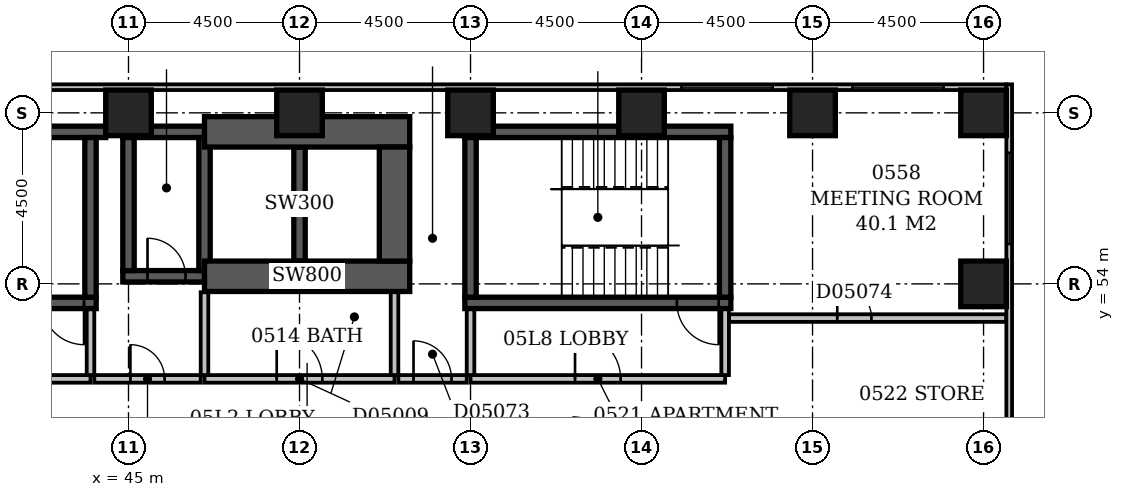
"""IFC4 building model, lengths in metres.
Left out: names, types, materials, properties, quantities, classifications, styles, units other than length and angle.
Written with IfcOpenShell. Run it as: python <this file> out.ifc"""

import sys

from ifc_helpers import new_model, si_unit, direction, frame, frame_2d, origin, origin_2d, place, context, subcontext, project, spatial, rectangle, extrude, element, fill, save


model = new_model("IFC4")
c1 = context("Model", 3, precision=1e-05, world=origin(), true_north=direction((0.0, 1.0)))
c2 = subcontext(c1, "Body", "Model", "MODEL_VIEW")
j1 = project(units=[si_unit("LENGTHUNIT", "METRE"), si_unit("PLANEANGLEUNIT", "RADIAN")], contexts=[c1])
p1 = place(None, origin())
s1 = spatial("IfcSite", under=j1, at=p1, CompositionType="ELEMENT")
p2 = place(p1, origin())
s2 = spatial("IfcBuilding", under=s1, at=p2, CompositionType="ELEMENT")
p3 = place(p2, frame((0.0, 0.0, 29.0)))
s3 = spatial("IfcBuildingStorey", under=s2, at=p3, CompositionType="ELEMENT", Elevation=29.0)
p4 = place(p3, frame((36.6, 58.0, -0.3), z_axis=(0.0, 0.0, 1.0), x_axis=(1.0, 0.0, 0.0)))
e1 = element("IfcWall", 1, at=p4, inside=s3, PredefinedType="SHEAR", context=c2, shape_type="SweptSolid", body=[
    extrude(rectangle(XDim=7.8, YDim=0.3, at=frame_2d((3.9, 0.0))), origin(), (0.0, 0.0, 1.0), 3.6),
])
p5 = place(p3, frame((37.15, 53.5, -0.3), z_axis=(0.0, 0.0, 1.0), x_axis=(1.0, 0.0, 0.0)))
e2 = element("IfcWall", 2, at=p5, inside=s3, PredefinedType="SHEAR", context=c2, shape_type="SweptSolid", body=[
    extrude(rectangle(XDim=7.0, YDim=0.3, at=frame_2d((3.5, 0.0))), origin(), (0.0, 0.0, 1.0), 3.6),
])
p6 = place(p5, frame((5.58, 0.0, 0.3)))
e3 = element("IfcOpeningElement", 3, at=p6, cuts=e2, PredefinedType="OPENING", context=c2, shape_type="SweptSolid", body=[
    extrude(rectangle(XDim=1.1, YDim=2.1, at=frame_2d((0.55, 1.05))), frame((0.0, 0.162, 0.0), z_axis=(0.0, -1.0, 0.0), x_axis=(1.0, 0.0, 0.0)), (0.0, 0.0, 1.0), 0.324),
])
p7 = place(p3, frame((44.0, 53.65, -0.3), z_axis=(0.0, 0.0, 1.0), x_axis=(0.0, 1.0, 0.0)))
e4 = element("IfcWall", 4, at=p7, inside=s3, PredefinedType="SHEAR", context=c2, shape_type="SweptSolid", body=[
    extrude(rectangle(XDim=4.2, YDim=0.3, at=frame_2d((2.1, 0.0))), origin(), (0.0, 0.0, 1.0), 3.6),
])
p8 = place(p3, frame((44.85, 54.2, -0.3), z_axis=(0.0, 0.0, 1.0), x_axis=(1.0, 0.0, 0.0)))
e5 = element("IfcWall", 5, at=p8, inside=s3, PredefinedType="SHEAR", context=c2, shape_type="SweptSolid", body=[
    extrude(rectangle(XDim=2.15, YDim=0.3, at=frame_2d((1.075, 0.0))), origin(), (0.0, 0.0, 1.0), 3.6),
])
p9 = place(p8, frame((0.65, 0.0, 0.3)))
e6 = element("IfcOpeningElement", 6, at=p9, cuts=e5, PredefinedType="OPENING", context=c2, shape_type="SweptSolid", body=[
    extrude(rectangle(XDim=1.0, YDim=2.1, at=frame_2d((0.5, 1.05))), frame((0.0, 0.162, 0.0), z_axis=(0.0, -1.0, 0.0), x_axis=(1.0, 0.0, 0.0)), (0.0, 0.0, 1.0), 0.324),
])
p10 = place(p3, frame((44.85, 58.0, -0.3), z_axis=(0.0, 0.0, 1.0), x_axis=(1.0, 0.0, 0.0)))
e7 = element("IfcWall", 7, at=p10, inside=s3, PredefinedType="SHEAR", context=c2, shape_type="SweptSolid", body=[
    extrude(rectangle(XDim=2.15, YDim=0.3, at=frame_2d((1.075, 0.0))), origin(), (0.0, 0.0, 1.0), 3.6),
])
p11 = place(p3, frame((45.0, 54.35, -0.3), z_axis=(0.0, 0.0, 1.0), x_axis=(0.0, 1.0, 0.0)))
e8 = element("IfcWall", 8, at=p11, inside=s3, PredefinedType="SHEAR", context=c2, shape_type="SweptSolid", body=[
    extrude(rectangle(XDim=3.5, YDim=0.3, at=frame_2d((1.75, 0.0))), origin(), (0.0, 0.0, 1.0), 3.6),
])
p12 = place(p3, frame((47.0, 54.2, -0.3), z_axis=(0.0, 0.0, 1.0), x_axis=(1.0, 0.0, 0.0)))
e9 = element("IfcWall", 9, at=p12, inside=s3, PredefinedType="SHEAR", context=c2, shape_type="SweptSolid", body=[
    extrude(rectangle(XDim=5.4, YDim=0.8, at=frame_2d((2.7, 0.0))), origin(), (0.0, 0.0, 1.0), 3.6),
])
p13 = place(p3, frame((47.0, 54.35, -0.3), z_axis=(0.0, 0.0, 1.0), x_axis=(0.0, 1.0, 0.0)))
e10 = element("IfcWall", 10, at=p13, inside=s3, PredefinedType="SHEAR", context=c2, shape_type="SweptSolid", body=[
    extrude(rectangle(XDim=3.5, YDim=0.3, at=frame_2d((1.75, 0.0))), origin(), (0.0, 0.0, 1.0), 3.6),
])
p14 = place(p3, frame((47.0, 58.0, -0.3), z_axis=(0.0, 0.0, 1.0), x_axis=(1.0, 0.0, 0.0)))
e11 = element("IfcWall", 11, at=p14, inside=s3, PredefinedType="SHEAR", context=c2, shape_type="SweptSolid", body=[
    extrude(rectangle(XDim=5.4, YDim=0.8, at=frame_2d((2.7, 0.0))), origin(), (0.0, 0.0, 1.0), 3.6),
])
p15 = place(p3, frame((49.5, 54.6, -0.3), z_axis=(0.0, 0.0, 1.0), x_axis=(0.0, 1.0, 0.0)))
e12 = element("IfcWall", 12, at=p15, inside=s3, PredefinedType="SHEAR", context=c2, shape_type="SweptSolid", body=[
    extrude(rectangle(XDim=3.0, YDim=0.3, at=frame_2d((1.5, 0.0))), origin(), (0.0, 0.0, 1.0), 3.6),
])
p16 = place(p3, frame((52.0, 54.6, -0.3), z_axis=(0.0, 0.0, 1.0), x_axis=(0.0, 1.0, 0.0)))
e13 = element("IfcWall", 13, at=p16, inside=s3, PredefinedType="SHEAR", context=c2, shape_type="SweptSolid", body=[
    extrude(rectangle(XDim=3.0, YDim=0.8, at=frame_2d((1.5, 0.0))), origin(), (0.0, 0.0, 1.0), 3.6),
])
p17 = place(p3, frame((53.85, 53.5, -0.3), z_axis=(0.0, 0.0, 1.0), x_axis=(1.0, 0.0, 0.0)))
e14 = element("IfcWall", 14, at=p17, inside=s3, PredefinedType="SHEAR", context=c2, shape_type="SweptSolid", body=[
    extrude(rectangle(XDim=7.0, YDim=0.3, at=frame_2d((3.5, 0.0))), origin(), (0.0, 0.0, 1.0), 3.6),
])
p18 = place(p17, frame((5.58, 0.0, 0.3)))
e15 = element("IfcOpeningElement", 15, at=p18, cuts=e14, PredefinedType="OPENING", context=c2, shape_type="SweptSolid", body=[
    extrude(rectangle(XDim=1.1, YDim=2.1, at=frame_2d((0.55, 1.05))), frame((0.0, 0.162, 0.0), z_axis=(0.0, -1.0, 0.0), x_axis=(1.0, 0.0, 0.0)), (0.0, 0.0, 1.0), 0.324),
])
p19 = place(p3, frame((53.85, 58.0, -0.3), z_axis=(0.0, 0.0, 1.0), x_axis=(1.0, 0.0, 0.0)))
e16 = element("IfcWall", 16, at=p19, inside=s3, PredefinedType="SHEAR", context=c2, shape_type="SweptSolid", body=[
    extrude(rectangle(XDim=7.0, YDim=0.3, at=frame_2d((3.5, 0.0))), origin(), (0.0, 0.0, 1.0), 3.6),
])
for number, where, z_axis, x_axis in (
    (17, (54.0, 53.65, -0.3), (0.0, 0.0, 1.0), (0.0, 1.0, 0.0)),
    (18, (60.7, 53.65, -0.3), (0.0, 0.0, 1.0), (0.0, 1.0, 0.0)),
):
    element("IfcWall", number, at=place(p3, frame(where, z_axis=z_axis, x_axis=x_axis)), inside=s3, PredefinedType="SHEAR", context=c2, shape_type="SweptSolid", body=[
        extrude(rectangle(XDim=4.2, YDim=0.3, at=frame_2d((2.1, 0.0))), origin(), (0.0, 0.0, 1.0), 3.6),
    ])
for number, where, z_axis, x_axis in (
    (19, (67.5, 54.0, -0.3), (0.0, 0.0, 1.0), (1.0, 0.0, 0.0)),
    (20, (45.0, 58.5, -0.3), (0.0, 0.0, 1.0), (1.0, 0.0, 0.0)),
    (21, (49.5, 58.5, -0.3), (0.0, 0.0, 1.0), (1.0, 0.0, 0.0)),
    (22, (54.0, 58.5, -0.3), (0.0, 0.0, 1.0), (1.0, 0.0, 0.0)),
    (23, (58.5, 58.5, -0.3), (0.0, 0.0, 1.0), (1.0, 0.0, 0.0)),
    (24, (63.0, 58.5, -0.3), (0.0, 0.0, 1.0), (1.0, 0.0, 0.0)),
    (25, (67.5, 58.5, -0.3), (0.0, 0.0, 1.0), (1.0, 0.0, 0.0)),
):
    element("IfcColumn", number, at=place(p3, frame(where, z_axis=z_axis, x_axis=x_axis)), inside=s3, PredefinedType="COLUMN", context=c2, shape_type="SweptSolid", body=[
        extrude(rectangle(XDim=1.2, YDim=1.2, at=origin_2d()), origin(), (0.0, 0.0, 1.0), 3.6),
    ])
p20 = place(p3, frame((68.175, 35.4, 0.0), z_axis=(0.0, 0.0, 1.0), x_axis=(0.0, 1.0, 0.0)))
e26 = element("IfcWall", 26, at=p20, inside=s3, PredefinedType="STANDARD", context=c2, shape_type="SweptSolid", body=[
    extrude(rectangle(XDim=23.85, YDim=0.15, at=frame_2d((11.925, 0.0))), origin(), (0.0, 0.0, 1.0), 2.7),
])
p21 = place(p20, frame((1.65, 0.0, 0.6)))
e27 = element("IfcOpeningElement", 27, at=p21, cuts=e26, PredefinedType="OPENING", context=c2, shape_type="SweptSolid", body=[
    extrude(rectangle(XDim=2.4, YDim=1.8, at=frame_2d((1.2, 0.9))), frame((0.0, 0.087, 0.0), z_axis=(0.0, -1.0, 0.0), x_axis=(1.0, 0.0, 0.0)), (0.0, 0.0, 1.0), 0.174),
])
p22 = place(p20, frame((19.65, 0.0, 0.6)))
e28 = element("IfcOpeningElement", 28, at=p22, cuts=e26, PredefinedType="OPENING", context=c2, shape_type="SweptSolid", body=[
    extrude(rectangle(XDim=2.4, YDim=1.8, at=frame_2d((1.2, 0.9))), frame((0.0, 0.087, 0.0), z_axis=(0.0, -1.0, 0.0), x_axis=(1.0, 0.0, 0.0)), (0.0, 0.0, 1.0), 0.174),
])
p23 = place(p3, frame((68.1, 59.175, 0.0), z_axis=(0.0, 0.0, 1.0), x_axis=(-1.0, 0.0, 0.0)))
e29 = element("IfcWall", 29, at=p23, inside=s3, PredefinedType="STANDARD", context=c2, shape_type="SweptSolid", body=[
    extrude(rectangle(XDim=68.85, YDim=0.15, at=frame_2d((34.425, 0.0))), origin(), (0.0, 0.0, 1.0), 2.7),
])
p24 = place(p23, frame((1.65, 0.0, 0.6)))
e30 = element("IfcOpeningElement", 30, at=p24, cuts=e29, PredefinedType="OPENING", context=c2, shape_type="SweptSolid", body=[
    extrude(rectangle(XDim=2.4, YDim=1.8, at=frame_2d((1.2, 0.9))), frame((0.0, 0.087, 0.0), z_axis=(0.0, -1.0, 0.0), x_axis=(1.0, 0.0, 0.0)), (0.0, 0.0, 1.0), 0.174),
])
p25 = place(p23, frame((6.15, 0.0, 0.6)))
e31 = element("IfcOpeningElement", 31, at=p25, cuts=e29, PredefinedType="OPENING", context=c2, shape_type="SweptSolid", body=[
    extrude(rectangle(XDim=2.4, YDim=1.8, at=frame_2d((1.2, 0.9))), frame((0.0, 0.087, 0.0), z_axis=(0.0, -1.0, 0.0), x_axis=(1.0, 0.0, 0.0)), (0.0, 0.0, 1.0), 0.174),
])
p26 = place(p23, frame((37.798, 0.0, 0.6)))
e32 = element("IfcOpeningElement", 32, at=p26, cuts=e29, PredefinedType="OPENING", context=c2, shape_type="SweptSolid", body=[
    extrude(rectangle(XDim=0.9, YDim=1.8, at=frame_2d((0.45, 0.9))), frame((0.0, 0.087, 0.0), z_axis=(0.0, -1.0, 0.0), x_axis=(1.0, 0.0, 0.0)), (0.0, 0.0, 1.0), 0.174),
])
p27 = place(p3, frame((47.0, 51.5, 0.0), z_axis=(0.0, 0.0, 1.0), x_axis=(1.0, 0.0, 0.0)))
e33 = element("IfcWall", 33, at=p27, inside=s3, PredefinedType="PARTITIONING", context=c2, shape_type="SweptSolid", body=[
    extrude(rectangle(XDim=5.0, YDim=0.2, at=frame_2d((2.5, 0.0))), origin(), (0.0, 0.0, 1.0), 3.3),
])
p28 = place(p27, frame((1.9, 0.0, 0.0)))
e34 = element("IfcOpeningElement", 34, at=p28, cuts=e33, PredefinedType="OPENING", context=c2, shape_type="SweptSolid", body=[
    extrude(rectangle(XDim=1.2, YDim=2.1, at=frame_2d((0.6, 1.05))), frame((0.0, 0.112, 0.0), z_axis=(0.0, -1.0, 0.0), x_axis=(1.0, 0.0, 0.0)), (0.0, 0.0, 1.0), 0.224),
])
for number, where, z_axis, x_axis in (
    (35, (52.0, 51.6, 0.0), (0.0, 0.0, 1.0), (0.0, 1.0, 0.0)),
    (36, (47.0, 51.6, 0.0), (0.0, 0.0, 1.0), (0.0, 1.0, 0.0)),
):
    element("IfcWall", number, at=place(p3, frame(where, z_axis=z_axis, x_axis=x_axis)), inside=s3, PredefinedType="PARTITIONING", context=c2, shape_type="SweptSolid", body=[
        extrude(rectangle(XDim=2.18, YDim=0.2, at=frame_2d((1.09, 0.0))), origin(), (0.0, 0.0, 1.0), 3.3),
    ])
p29 = place(p3, frame((37.3, 51.5, 0.0), z_axis=(0.0, 0.0, 1.0), x_axis=(1.0, 0.0, 0.0)))
e37 = element("IfcWall", 37, at=p29, inside=s3, PredefinedType="PARTITIONING", context=c2, shape_type="SweptSolid", body=[
    extrude(rectangle(XDim=6.7, YDim=0.2, at=frame_2d((3.35, 0.0))), origin(), (0.0, 0.0, 1.0), 3.3),
])
p30 = place(p29, frame((2.75, 0.0, 0.0)))
e38 = element("IfcOpeningElement", 38, at=p30, cuts=e37, PredefinedType="OPENING", context=c2, shape_type="SweptSolid", body=[
    extrude(rectangle(XDim=1.2, YDim=2.1, at=frame_2d((0.6, 1.05))), frame((0.0, 0.112, 0.0), z_axis=(0.0, -1.0, 0.0), x_axis=(1.0, 0.0, 0.0)), (0.0, 0.0, 1.0), 0.224),
])
p31 = place(p3, frame((44.0, 51.6, 0.0), z_axis=(0.0, 0.0, 1.0), x_axis=(0.0, 1.0, 0.0)))
e39 = element("IfcWall", 39, at=p31, inside=s3, PredefinedType="PARTITIONING", context=c2, shape_type="SweptSolid", body=[
    extrude(rectangle(XDim=1.73, YDim=0.2, at=frame_2d((0.865, 0.0))), origin(), (0.0, 0.0, 1.0), 3.3),
])
p32 = place(p3, frame((54.0, 51.5, 0.0), z_axis=(0.0, 0.0, 1.0), x_axis=(1.0, 0.0, 0.0)))
e40 = element("IfcWall", 40, at=p32, inside=s3, PredefinedType="PARTITIONING", context=c2, shape_type="SweptSolid", body=[
    extrude(rectangle(XDim=6.7, YDim=0.2, at=frame_2d((3.35, 0.0))), origin(), (0.0, 0.0, 1.0), 3.3),
])
p33 = place(p32, frame((2.75, 0.0, 0.0)))
e41 = element("IfcOpeningElement", 41, at=p33, cuts=e40, PredefinedType="OPENING", context=c2, shape_type="SweptSolid", body=[
    extrude(rectangle(XDim=1.2, YDim=2.1, at=frame_2d((0.6, 1.05))), frame((0.0, 0.112, 0.0), z_axis=(0.0, -1.0, 0.0), x_axis=(1.0, 0.0, 0.0)), (0.0, 0.0, 1.0), 0.224),
])
p34 = place(p3, frame((60.7, 51.6, 0.0), z_axis=(0.0, 0.0, 1.0), x_axis=(0.0, 1.0, 0.0)))
e42 = element("IfcWall", 42, at=p34, inside=s3, PredefinedType="PARTITIONING", context=c2, shape_type="SweptSolid", body=[
    extrude(rectangle(XDim=1.73, YDim=0.2, at=frame_2d((0.865, 0.0))), origin(), (0.0, 0.0, 1.0), 3.3),
])
p35 = place(p3, frame((54.0, 51.6, 0.0), z_axis=(0.0, 0.0, 1.0), x_axis=(0.0, 1.0, 0.0)))
e43 = element("IfcWall", 43, at=p35, inside=s3, PredefinedType="PARTITIONING", context=c2, shape_type="SweptSolid", body=[
    extrude(rectangle(XDim=1.73, YDim=0.2, at=frame_2d((0.865, 0.0))), origin(), (0.0, 0.0, 1.0), 2.6),
])
p36 = place(p3, frame((44.1, 51.5, 0.0), z_axis=(0.0, 0.0, 1.0), x_axis=(1.0, 0.0, 0.0)))
e44 = element("IfcWall", 44, at=p36, inside=s3, PredefinedType="PARTITIONING", context=c2, shape_type="SweptSolid", body=[
    extrude(rectangle(XDim=2.8, YDim=0.2, at=frame_2d((1.4, 0.0))), origin(), (0.0, 0.0, 1.0), 3.3),
])
p37 = place(p36, frame((0.95, 0.0, 0.0)))
e45 = element("IfcOpeningElement", 45, at=p37, cuts=e44, PredefinedType="OPENING", context=c2, shape_type="SweptSolid", body=[
    extrude(rectangle(XDim=0.9, YDim=2.1, at=frame_2d((0.45, 1.05))), frame((0.0, 0.112, 0.0), z_axis=(0.0, -1.0, 0.0), x_axis=(1.0, 0.0, 0.0)), (0.0, 0.0, 1.0), 0.224),
])
p38 = place(p3, frame((52.1, 51.5, 0.0), z_axis=(0.0, 0.0, 1.0), x_axis=(1.0, 0.0, 0.0)))
e46 = element("IfcWall", 46, at=p38, inside=s3, PredefinedType="PARTITIONING", context=c2, shape_type="SweptSolid", body=[
    extrude(rectangle(XDim=1.8, YDim=0.2, at=frame_2d((0.9, 0.0))), origin(), (0.0, 0.0, 1.0), 3.3),
])
p39 = place(p38, frame((0.4, 0.0, 0.0)))
e47 = element("IfcOpeningElement", 47, at=p39, cuts=e46, PredefinedType="OPENING", context=c2, shape_type="SweptSolid", body=[
    extrude(rectangle(XDim=1.0, YDim=2.1, at=frame_2d((0.5, 1.05))), frame((0.0, 0.112, 0.0), z_axis=(0.0, -1.0, 0.0), x_axis=(1.0, 0.0, 0.0)), (0.0, 0.0, 1.0), 0.224),
])
p40 = place(p3, frame((60.8, 53.1, 0.0), z_axis=(0.0, 0.0, 1.0), x_axis=(1.0, 0.0, 0.0)))
e48 = element("IfcWall", 48, at=p40, inside=s3, PredefinedType="PARTITIONING", context=c2, shape_type="SweptSolid", body=[
    extrude(rectangle(XDim=7.3, YDim=0.2, at=frame_2d((3.65, 0.0))), origin(), (0.0, 0.0, 1.0), 3.3),
])
p41 = place(p40, frame((2.85, 0.0, 0.0)))
e49 = element("IfcOpeningElement", 49, at=p41, cuts=e48, PredefinedType="OPENING", context=c2, shape_type="SweptSolid", body=[
    extrude(rectangle(XDim=0.9, YDim=2.1, at=frame_2d((0.45, 1.05))), frame((0.0, 0.112, 0.0), z_axis=(0.0, -1.0, 0.0), x_axis=(1.0, 0.0, 0.0)), (0.0, 0.0, 1.0), 0.224),
])
p42 = place(p22, origin())
e50 = element("IfcWindow", 50, at=p42, inside=s3, PartitioningType="SINGLE_PANEL", PredefinedType="WINDOW", context=c2, shape_type="SweptSolid", body=[
    extrude(rectangle(XDim=2.4, YDim=1.8, at=frame_2d((1.2, 0.9))), frame((0.0, 0.03, 0.0), z_axis=(0.0, -1.0, 0.0), x_axis=(1.0, 0.0, 0.0)), (0.0, 0.0, 1.0), 0.06),
])
fill(e28, e50)
p43 = place(p24, origin())
e51 = element("IfcWindow", 51, at=p43, inside=s3, PartitioningType="SINGLE_PANEL", PredefinedType="WINDOW", context=c2, shape_type="SweptSolid", body=[
    extrude(rectangle(XDim=2.4, YDim=1.8, at=frame_2d((1.2, 0.9))), frame((0.0, 0.03, 0.0), z_axis=(0.0, -1.0, 0.0), x_axis=(1.0, 0.0, 0.0)), (0.0, 0.0, 1.0), 0.06),
])
fill(e30, e51)
p44 = place(p25, origin())
e52 = element("IfcWindow", 52, at=p44, inside=s3, PartitioningType="SINGLE_PANEL", PredefinedType="WINDOW", context=c2, shape_type="SweptSolid", body=[
    extrude(rectangle(XDim=2.4, YDim=1.8, at=frame_2d((1.2, 0.9))), frame((0.0, 0.03, 0.0), z_axis=(0.0, -1.0, 0.0), x_axis=(1.0, 0.0, 0.0)), (0.0, 0.0, 1.0), 0.06),
])
fill(e31, e52)
p45 = place(p33, origin())
e53 = element("IfcDoor", 53, at=p45, inside=s3, OperationType="SINGLE_SWING_LEFT", PredefinedType="DOOR", context=c2, shape_type="SweptSolid", body=[
    extrude(rectangle(XDim=1.2, YDim=2.1, at=frame_2d((0.6, 1.05))), frame((0.0, 0.025, 0.0), z_axis=(0.0, -1.0, 0.0), x_axis=(1.0, 0.0, 0.0)), (0.0, 0.0, 1.0), 0.05),
])
fill(e41, e53)
p46 = place(p28, origin())
e54 = element("IfcDoor", 54, at=p46, inside=s3, OperationType="SINGLE_SWING_LEFT", PredefinedType="DOOR", context=c2, shape_type="SweptSolid", body=[
    extrude(rectangle(XDim=1.2, YDim=2.1, at=frame_2d((0.6, 1.05))), frame((0.0, 0.025, 0.0), z_axis=(0.0, -1.0, 0.0), x_axis=(1.0, 0.0, 0.0)), (0.0, 0.0, 1.0), 0.05),
])
fill(e34, e54)
p47 = place(p9, origin())
e55 = element("IfcDoor", 55, at=p47, inside=s3, OperationType="SINGLE_SWING_LEFT", PredefinedType="DOOR", context=c2, shape_type="SweptSolid", body=[
    extrude(rectangle(XDim=1.0, YDim=2.1, at=frame_2d((0.5, 1.05))), frame((0.0, 0.025, 0.0), z_axis=(0.0, -1.0, 0.0), x_axis=(1.0, 0.0, 0.0)), (0.0, 0.0, 1.0), 0.05),
])
fill(e6, e55)
p48 = place(p6, origin())
e56 = element("IfcDoor", 56, at=p48, inside=s3, OperationType="SINGLE_SWING_RIGHT", PredefinedType="DOOR", context=c2, shape_type="SweptSolid", body=[
    extrude(rectangle(XDim=1.1, YDim=2.1, at=frame_2d((0.55, 1.05))), frame((0.0, 0.025, 0.0), z_axis=(0.0, -1.0, 0.0), x_axis=(1.0, 0.0, 0.0)), (0.0, 0.0, 1.0), 0.05),
])
fill(e3, e56)
p49 = place(p18, origin())
e57 = element("IfcDoor", 57, at=p49, inside=s3, OperationType="SINGLE_SWING_RIGHT", PredefinedType="DOOR", context=c2, shape_type="SweptSolid", body=[
    extrude(rectangle(XDim=1.1, YDim=2.1, at=frame_2d((0.55, 1.05))), frame((0.0, 0.025, 0.0), z_axis=(0.0, -1.0, 0.0), x_axis=(1.0, 0.0, 0.0)), (0.0, 0.0, 1.0), 0.05),
])
fill(e15, e57)
p50 = place(p37, origin())
e58 = element("IfcDoor", 58, at=p50, inside=s3, OperationType="SINGLE_SWING_LEFT", PredefinedType="DOOR", context=c2, shape_type="SweptSolid", body=[
    extrude(rectangle(XDim=0.9, YDim=2.1, at=frame_2d((0.45, 1.05))), frame((0.0, 0.025, 0.0), z_axis=(0.0, -1.0, 0.0), x_axis=(1.0, 0.0, 0.0)), (0.0, 0.0, 1.0), 0.05),
])
fill(e45, e58)
p51 = place(p39, origin())
e59 = element("IfcDoor", 59, at=p51, inside=s3, OperationType="SINGLE_SWING_LEFT", PredefinedType="DOOR", context=c2, shape_type="SweptSolid", body=[
    extrude(rectangle(XDim=1.0, YDim=2.1, at=frame_2d((0.5, 1.05))), frame((0.0, 0.025, 0.0), z_axis=(0.0, -1.0, 0.0), x_axis=(1.0, 0.0, 0.0)), (0.0, 0.0, 1.0), 0.05),
])
fill(e47, e59)
p52 = place(p41, origin())
e60 = element("IfcDoor", 60, at=p52, inside=s3, OperationType="SINGLE_SWING_LEFT", PredefinedType="DOOR", context=c2, shape_type="SweptSolid", body=[
    extrude(rectangle(XDim=0.9, YDim=2.1, at=frame_2d((0.45, 1.05))), frame((0.0, 0.025, 0.0), z_axis=(0.0, -1.0, 0.0), x_axis=(1.0, 0.0, 0.0)), (0.0, 0.0, 1.0), 0.05),
])
fill(e49, e60)
save(model, sys.argv[1])
